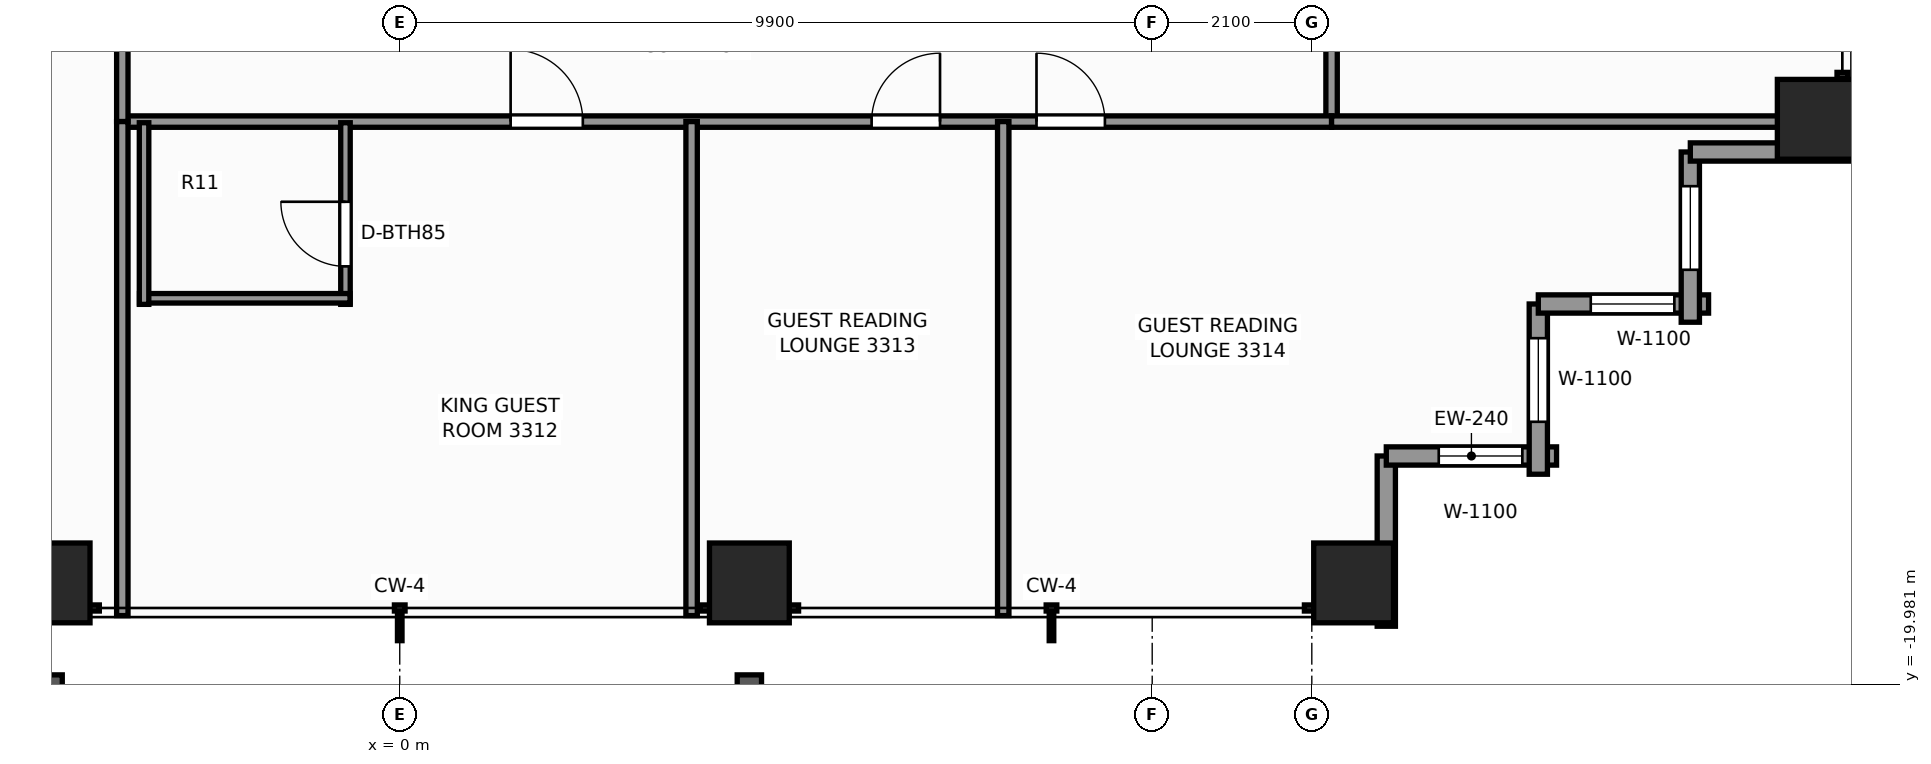
"""IFC4 building model, lengths in metres.
Left out: names, types, materials, properties, quantities, classifications, styles, units other than length and angle.
Written with IfcOpenShell. Run it as: python <this file> out.ifc"""

import sys

from ifc_helpers import new_model, si_unit, direction, frame, frame_2d, origin, origin_2d, place, context, subcontext, project, spatial, rectangle, extrude, element, fill, save


model = new_model("IFC4")
c1 = context("Model", 3, precision=1e-05, world=origin(), true_north=direction((0.0, 1.0)))
c2 = subcontext(c1, "Body", "Model", "MODEL_VIEW")
j1 = project(units=[si_unit("LENGTHUNIT", "METRE"), si_unit("PLANEANGLEUNIT", "RADIAN")], contexts=[c1])
p1 = place(None, origin())
s1 = spatial("IfcSite", under=j1, at=p1, CompositionType="ELEMENT")
p2 = place(p1, origin())
s2 = spatial("IfcBuilding", under=s1, at=p2, CompositionType="ELEMENT")
p3 = place(p2, frame((0.0, 0.0, 115.1)))
s3 = spatial("IfcBuildingStorey", under=s2, at=p3, CompositionType="ELEMENT", Elevation=115.1)
for number, where, z_axis, x_axis in (
    (1, (-4.6, -18.65, 0.0), (0.0, 0.0, 1.0), (1.0, 0.0, 0.0)),
    (2, (4.6, -18.65, 0.0), (0.0, 0.0, 1.0), (1.0, 0.0, 0.0)),
    (3, (12.55, -18.65, 0.0), (0.0, 0.0, 1.0), (1.0, 0.0, 0.0)),
    (4, (18.65, -12.55, 0.0), (0.0, 0.0, 1.0), (1.0, 0.0, 0.0)),
):
    element("IfcColumn", number, at=place(p3, frame(where, z_axis=z_axis, x_axis=x_axis)), inside=s3, PredefinedType="COLUMN", context=c2, shape_type="SweptSolid", body=[
        extrude(rectangle(XDim=1.05, YDim=1.05, at=origin_2d()), origin(), (0.0, 0.0, 1.0), 3.3),
    ])
p4 = place(p3, frame((12.98, -16.98, 0.0), z_axis=(0.0, 0.0, 1.0), x_axis=(0.0, -1.0, 0.0)))
e5 = element("IfcWall", 5, at=p4, inside=s3, PredefinedType="STANDARD", context=c2, shape_type="SweptSolid", body=[
    extrude(rectangle(XDim=2.24, YDim=0.24, at=frame_2d((1.12, 0.0))), origin(), (0.0, 0.0, 1.0), 2.459),
])
p5 = place(p3, frame((15.22, -16.98, 0.0), z_axis=(0.0, 0.0, 1.0), x_axis=(-1.0, 0.0, 0.0)))
e6 = element("IfcWall", 6, at=p5, inside=s3, PredefinedType="STANDARD", context=c2, shape_type="SweptSolid", body=[
    extrude(rectangle(XDim=2.24, YDim=0.24, at=frame_2d((1.12, 0.0))), origin(), (0.0, 0.0, 1.0), 2.459),
])
p6 = place(p5, frame((0.45, 0.0, 0.65)))
e7 = element("IfcOpeningElement", 7, at=p6, cuts=e6, PredefinedType="OPENING", context=c2, shape_type="SweptSolid", body=[
    extrude(rectangle(XDim=1.1, YDim=1.45, at=frame_2d((0.55, 0.725))), frame((0.0, 0.13, 0.0), z_axis=(0.0, -1.0, 0.0), x_axis=(1.0, 0.0, 0.0)), (0.0, 0.0, 1.0), 0.26),
])
p7 = place(p3, frame((14.98, -14.98, 0.0), z_axis=(0.0, 0.0, 1.0), x_axis=(0.0, -1.0, 0.0)))
e8 = element("IfcWall", 8, at=p7, inside=s3, PredefinedType="STANDARD", context=c2, shape_type="SweptSolid", body=[
    extrude(rectangle(XDim=2.24, YDim=0.24, at=frame_2d((1.12, 0.0))), origin(), (0.0, 0.0, 1.0), 2.459),
])
p8 = place(p7, frame((0.45, 0.0, 0.65)))
e9 = element("IfcOpeningElement", 9, at=p8, cuts=e8, PredefinedType="OPENING", context=c2, shape_type="SweptSolid", body=[
    extrude(rectangle(XDim=1.1, YDim=1.45, at=frame_2d((0.55, 0.725))), frame((0.0, 0.13, 0.0), z_axis=(0.0, -1.0, 0.0), x_axis=(1.0, 0.0, 0.0)), (0.0, 0.0, 1.0), 0.26),
])
p9 = place(p3, frame((17.22, -14.98, 0.0), z_axis=(0.0, 0.0, 1.0), x_axis=(-1.0, 0.0, 0.0)))
e10 = element("IfcWall", 10, at=p9, inside=s3, PredefinedType="STANDARD", context=c2, shape_type="SweptSolid", body=[
    extrude(rectangle(XDim=2.24, YDim=0.24, at=frame_2d((1.12, 0.0))), origin(), (0.0, 0.0, 1.0), 2.459),
])
p10 = place(p9, frame((0.45, 0.0, 0.65)))
e11 = element("IfcOpeningElement", 11, at=p10, cuts=e10, PredefinedType="OPENING", context=c2, shape_type="SweptSolid", body=[
    extrude(rectangle(XDim=1.1, YDim=1.45, at=frame_2d((0.55, 0.725))), frame((0.0, 0.13, 0.0), z_axis=(0.0, -1.0, 0.0), x_axis=(1.0, 0.0, 0.0)), (0.0, 0.0, 1.0), 0.26),
])
p11 = place(p3, frame((16.98, -12.98, 0.0), z_axis=(0.0, 0.0, 1.0), x_axis=(0.0, -1.0, 0.0)))
e12 = element("IfcWall", 12, at=p11, inside=s3, PredefinedType="STANDARD", context=c2, shape_type="SweptSolid", body=[
    extrude(rectangle(XDim=2.24, YDim=0.24, at=frame_2d((1.12, 0.0))), origin(), (0.0, 0.0, 1.0), 2.459),
])
p12 = place(p11, frame((0.45, 0.0, 0.65)))
e13 = element("IfcOpeningElement", 13, at=p12, cuts=e12, PredefinedType="OPENING", context=c2, shape_type="SweptSolid", body=[
    extrude(rectangle(XDim=1.1, YDim=1.45, at=frame_2d((0.55, 0.725))), frame((0.0, 0.13, 0.0), z_axis=(0.0, -1.0, 0.0), x_axis=(1.0, 0.0, 0.0)), (0.0, 0.0, 1.0), 0.26),
])
p13 = place(p3, frame((19.22, -12.98, 0.0), z_axis=(0.0, 0.0, 1.0), x_axis=(-1.0, 0.0, 0.0)))
e14 = element("IfcWall", 14, at=p13, inside=s3, PredefinedType="STANDARD", context=c2, shape_type="SweptSolid", body=[
    extrude(rectangle(XDim=2.24, YDim=0.24, at=frame_2d((1.12, 0.0))), origin(), (0.0, 0.0, 1.0), 2.459),
])
p14 = place(p3, frame((12.26, -12.58, 0.0), z_axis=(0.0, 0.0, 1.0), x_axis=(0.0, 1.0, 0.0)))
e15 = element("IfcWall", 15, at=p14, inside=s3, PredefinedType="PARTITIONING", context=c2, shape_type="SweptSolid", body=[
    extrude(rectangle(XDim=24.84, YDim=0.15, at=frame_2d((12.42, 0.0))), origin(), (0.0, 0.0, 1.0), 2.292),
])
p15 = place(p14, frame((3.104, 0.0, 0.0)))
e16 = element("IfcOpeningElement", 16, at=p15, cuts=e15, PredefinedType="OPENING", context=c2, shape_type="SweptSolid", body=[
    extrude(rectangle(XDim=0.9, YDim=2.06, at=frame_2d((0.45, 1.03))), frame((0.0, 0.085, 0.0), z_axis=(0.0, -1.0, 0.0), x_axis=(1.0, 0.0, 0.0)), (0.0, 0.0, 1.0), 0.17),
])
p16 = place(p14, frame((5.439, 0.0, 0.0)))
e17 = element("IfcOpeningElement", 17, at=p16, cuts=e15, PredefinedType="OPENING", context=c2, shape_type="SweptSolid", body=[
    extrude(rectangle(XDim=0.9, YDim=2.06, at=frame_2d((0.45, 1.03))), frame((0.0, 0.085, 0.0), z_axis=(0.0, -1.0, 0.0), x_axis=(1.0, 0.0, 0.0)), (0.0, 0.0, 1.0), 0.17),
])
p17 = place(p14, frame((13.219, 0.0, 0.0)))
e18 = element("IfcOpeningElement", 18, at=p17, cuts=e15, PredefinedType="OPENING", context=c2, shape_type="SweptSolid", body=[
    extrude(rectangle(XDim=0.95, YDim=2.06, at=frame_2d((0.475, 1.03))), frame((0.0, 0.085, 0.0), z_axis=(0.0, -1.0, 0.0), x_axis=(1.0, 0.0, 0.0)), (0.0, 0.0, 1.0), 0.17),
])
p18 = place(p14, frame((18.377, 0.0, 0.0)))
e19 = element("IfcOpeningElement", 19, at=p18, cuts=e15, PredefinedType="OPENING", context=c2, shape_type="SweptSolid", body=[
    extrude(rectangle(XDim=0.95, YDim=2.06, at=frame_2d((0.475, 1.03))), frame((0.0, 0.085, 0.0), z_axis=(0.0, -1.0, 0.0), x_axis=(1.0, 0.0, 0.0)), (0.0, 0.0, 1.0), 0.17),
])
p19 = place(p14, frame((20.737, 0.0, 0.0)))
e20 = element("IfcOpeningElement", 20, at=p19, cuts=e15, PredefinedType="OPENING", context=c2, shape_type="SweptSolid", body=[
    extrude(rectangle(XDim=0.9, YDim=2.06, at=frame_2d((0.45, 1.03))), frame((0.0, 0.085, 0.0), z_axis=(0.0, -1.0, 0.0), x_axis=(1.0, 0.0, 0.0)), (0.0, 0.0, 1.0), 0.17),
])
p20 = place(p3, frame((-3.65, -12.58, 0.0), z_axis=(0.0, 0.0, 1.0), x_axis=(1.0, 0.0, 0.0)))
e21 = element("IfcWall", 21, at=p20, inside=s3, PredefinedType="PARTITIONING", context=c2, shape_type="SweptSolid", body=[
    extrude(rectangle(XDim=15.91, YDim=0.15, at=frame_2d((7.955, 0.0))), origin(), (0.0, 0.0, 1.0), 2.292),
])
p21 = place(p20, frame((5.109, 0.0, 0.0)))
e22 = element("IfcOpeningElement", 22, at=p21, cuts=e21, PredefinedType="OPENING", context=c2, shape_type="SweptSolid", body=[
    extrude(rectangle(XDim=0.95, YDim=2.06, at=frame_2d((0.475, 1.03))), frame((0.0, 0.085, 0.0), z_axis=(0.0, -1.0, 0.0), x_axis=(1.0, 0.0, 0.0)), (0.0, 0.0, 1.0), 0.17),
])
p22 = place(p20, frame((9.858, 0.0, 0.0)))
e23 = element("IfcOpeningElement", 23, at=p22, cuts=e21, PredefinedType="OPENING", context=c2, shape_type="SweptSolid", body=[
    extrude(rectangle(XDim=0.9, YDim=2.06, at=frame_2d((0.45, 1.03))), frame((0.0, 0.085, 0.0), z_axis=(0.0, -1.0, 0.0), x_axis=(1.0, 0.0, 0.0)), (0.0, 0.0, 1.0), 0.17),
])
p23 = place(p20, frame((12.028, 0.0, 0.0)))
e24 = element("IfcOpeningElement", 24, at=p23, cuts=e21, PredefinedType="OPENING", context=c2, shape_type="SweptSolid", body=[
    extrude(rectangle(XDim=0.9, YDim=2.06, at=frame_2d((0.45, 1.03))), frame((0.0, 0.085, 0.0), z_axis=(0.0, -1.0, 0.0), x_axis=(1.0, 0.0, 0.0)), (0.0, 0.0, 1.0), 0.17),
])
p24 = place(p3, frame((-3.65, -12.58, 0.0), z_axis=(0.0, 0.0, 1.0), x_axis=(0.0, 1.0, 0.0)))
e25 = element("IfcWall", 25, at=p24, inside=s3, PredefinedType="PARTITIONING", context=c2, shape_type="SweptSolid", body=[
    extrude(rectangle(XDim=2.68, YDim=0.15, at=frame_2d((1.34, 0.0))), origin(), (0.0, 0.0, 1.0), 3.08),
])
p25 = place(p3, frame((12.26, -12.58, 0.0), z_axis=(0.0, 0.0, 1.0), x_axis=(1.0, 0.0, 0.0)))
e26 = element("IfcWall", 26, at=p25, inside=s3, PredefinedType="PARTITIONING", context=c2, shape_type="SweptSolid", body=[
    extrude(rectangle(XDim=6.82, YDim=0.15, at=frame_2d((3.41, 0.0))), origin(), (0.0, 0.0, 1.0), 2.292),
])
for number, where, z_axis, x_axis in (
    (27, (-3.65, -19.08, 0.0), (0.0, 0.0, 1.0), (0.0, 1.0, 0.0)),
    (28, (3.84, -19.08, 0.0), (0.0, 0.0, 1.0), (0.0, 1.0, 0.0)),
):
    element("IfcWall", number, at=place(p3, frame(where, z_axis=z_axis, x_axis=x_axis)), inside=s3, PredefinedType="PARTITIONING", context=c2, shape_type="SweptSolid", body=[
        extrude(rectangle(XDim=6.5, YDim=0.15, at=frame_2d((3.25, 0.0))), origin(), (0.0, 0.0, 1.0), 2.449),
    ])
p26 = place(p3, frame((-0.714, -14.985, 0.0), z_axis=(0.0, 0.0, 1.0), x_axis=(0.0, 1.0, 0.0)))
e29 = element("IfcWall", 29, at=p26, inside=s3, PredefinedType="PARTITIONING", context=c2, shape_type="SweptSolid", body=[
    extrude(rectangle(XDim=2.39, YDim=0.125, at=frame_2d((1.195, 0.0))), origin(), (0.0, 0.0, 1.0), 3.08),
])
p27 = place(p26, frame((0.5, 0.0, 0.0)))
e30 = element("IfcOpeningElement", 30, at=p27, cuts=e29, PredefinedType="OPENING", context=c2, shape_type="SweptSolid", body=[
    extrude(rectangle(XDim=0.85, YDim=2.03, at=frame_2d((0.425, 1.015))), frame((0.0, 0.073, 0.0), z_axis=(0.0, -1.0, 0.0), x_axis=(1.0, 0.0, 0.0)), (0.0, 0.0, 1.0), 0.145),
])
p28 = place(p3, frame((-3.424, -14.905, 0.0), z_axis=(0.0, 0.0, 1.0), x_axis=(1.0, 0.0, 0.0)))
e31 = element("IfcWall", 31, at=p28, inside=s3, PredefinedType="PARTITIONING", context=c2, shape_type="SweptSolid", body=[
    extrude(rectangle(XDim=2.77, YDim=0.125, at=frame_2d((1.385, 0.0))), origin(), (0.0, 0.0, 1.0), 2.369),
])
p29 = place(p3, frame((-3.364, -14.985, 0.0), z_axis=(0.0, 0.0, 1.0), x_axis=(0.0, 1.0, 0.0)))
e32 = element("IfcWall", 32, at=p29, inside=s3, PredefinedType="PARTITIONING", context=c2, shape_type="SweptSolid", body=[
    extrude(rectangle(XDim=2.39, YDim=0.125, at=frame_2d((1.195, 0.0))), origin(), (0.0, 0.0, 1.0), 3.08),
])
p30 = place(p3, frame((7.94, -19.08, 0.0), z_axis=(0.0, 0.0, 1.0), x_axis=(0.0, 1.0, 0.0)))
e33 = element("IfcWall", 33, at=p30, inside=s3, PredefinedType="PARTITIONING", context=c2, shape_type="SweptSolid", body=[
    extrude(rectangle(XDim=6.5, YDim=0.15, at=frame_2d((3.25, 0.0))), origin(), (0.0, 0.0, 1.0), 2.449),
])
p31 = place(p6, origin())
e34 = element("IfcWindow", 34, at=p31, inside=s3, PartitioningType="SINGLE_PANEL", PredefinedType="WINDOW", context=c2, shape_type="SweptSolid", body=[
    extrude(rectangle(XDim=1.1, YDim=1.45, at=frame_2d((0.55, 0.725))), frame((0.0, 0.03, 0.0), z_axis=(0.0, -1.0, 0.0), x_axis=(1.0, 0.0, 0.0)), (0.0, 0.0, 1.0), 0.06),
])
fill(e7, e34)
p32 = place(p8, origin())
e35 = element("IfcWindow", 35, at=p32, inside=s3, PartitioningType="SINGLE_PANEL", PredefinedType="WINDOW", context=c2, shape_type="SweptSolid", body=[
    extrude(rectangle(XDim=1.1, YDim=1.45, at=frame_2d((0.55, 0.725))), frame((0.0, 0.03, 0.0), z_axis=(0.0, -1.0, 0.0), x_axis=(1.0, 0.0, 0.0)), (0.0, 0.0, 1.0), 0.06),
])
fill(e9, e35)
p33 = place(p10, origin())
e36 = element("IfcWindow", 36, at=p33, inside=s3, PartitioningType="SINGLE_PANEL", PredefinedType="WINDOW", context=c2, shape_type="SweptSolid", body=[
    extrude(rectangle(XDim=1.1, YDim=1.45, at=frame_2d((0.55, 0.725))), frame((0.0, 0.03, 0.0), z_axis=(0.0, -1.0, 0.0), x_axis=(1.0, 0.0, 0.0)), (0.0, 0.0, 1.0), 0.06),
])
fill(e11, e36)
p34 = place(p12, origin())
e37 = element("IfcWindow", 37, at=p34, inside=s3, PartitioningType="SINGLE_PANEL", PredefinedType="WINDOW", context=c2, shape_type="SweptSolid", body=[
    extrude(rectangle(XDim=1.1, YDim=1.45, at=frame_2d((0.55, 0.725))), frame((0.0, 0.03, 0.0), z_axis=(0.0, -1.0, 0.0), x_axis=(1.0, 0.0, 0.0)), (0.0, 0.0, 1.0), 0.06),
])
fill(e13, e37)
p35 = place(p27, origin())
e38 = element("IfcDoor", 38, at=p35, inside=s3, OperationType="SINGLE_SWING_RIGHT", PredefinedType="DOOR", context=c2, shape_type="SweptSolid", body=[
    extrude(rectangle(XDim=0.85, YDim=2.03, at=frame_2d((0.425, 1.015))), frame((0.0, 0.025, 0.0), z_axis=(0.0, -1.0, 0.0), x_axis=(1.0, 0.0, 0.0)), (0.0, 0.0, 1.0), 0.05),
])
fill(e30, e38)
p36 = place(p21, origin())
e39 = element("IfcDoor", 39, at=p36, inside=s3, OperationType="SINGLE_SWING_LEFT", PredefinedType="DOOR", context=c2, shape_type="SweptSolid", body=[
    extrude(rectangle(XDim=0.95, YDim=2.06, at=frame_2d((0.475, 1.03))), frame((0.0, 0.025, 0.0), z_axis=(0.0, -1.0, 0.0), x_axis=(1.0, 0.0, 0.0)), (0.0, 0.0, 1.0), 0.05),
])
fill(e22, e39)
p37 = place(p22, origin())
e40 = element("IfcDoor", 40, at=p37, inside=s3, OperationType="SINGLE_SWING_RIGHT", PredefinedType="DOOR", context=c2, shape_type="SweptSolid", body=[
    extrude(rectangle(XDim=0.9, YDim=2.06, at=frame_2d((0.45, 1.03))), frame((0.0, 0.025, 0.0), z_axis=(0.0, -1.0, 0.0), x_axis=(1.0, 0.0, 0.0)), (0.0, 0.0, 1.0), 0.05),
])
fill(e23, e40)
p38 = place(p23, origin())
e41 = element("IfcDoor", 41, at=p38, inside=s3, OperationType="SINGLE_SWING_LEFT", PredefinedType="DOOR", context=c2, shape_type="SweptSolid", body=[
    extrude(rectangle(XDim=0.9, YDim=2.06, at=frame_2d((0.45, 1.03))), frame((0.0, 0.025, 0.0), z_axis=(0.0, -1.0, 0.0), x_axis=(1.0, 0.0, 0.0)), (0.0, 0.0, 1.0), 0.05),
])
fill(e24, e41)
save(model, sys.argv[1])
